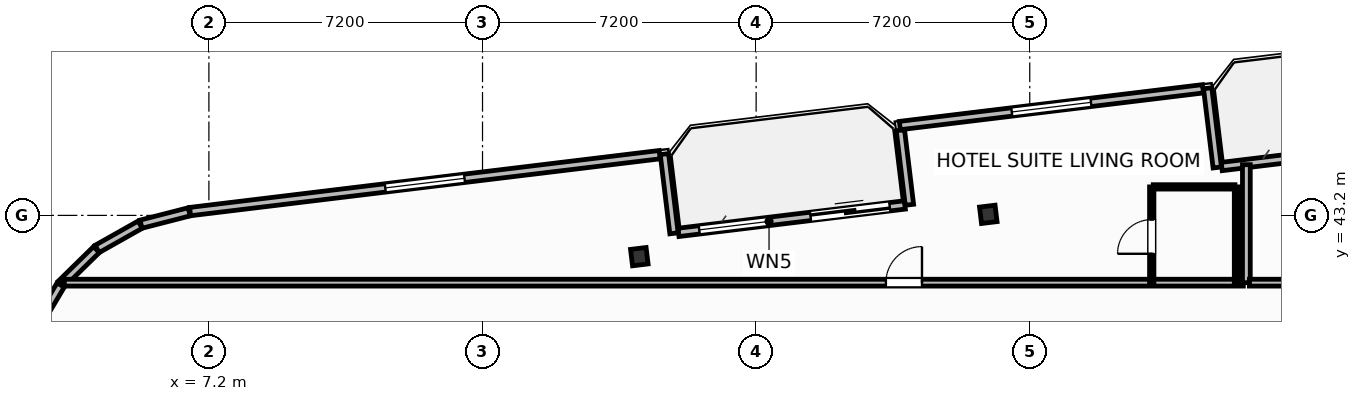
"""IFC4 building model, lengths in metres.
Left out: names, types, materials, properties, quantities, classifications, styles, units other than length and angle.
Written with IfcOpenShell. Run it as: python <this file> out.ifc"""

import sys

from ifc_helpers import new_model, si_unit, direction, frame, frame_2d, origin, origin_2d, place, context, subcontext, project, spatial, rectangle, i_section, extrude, element, fill, save


model = new_model("IFC4")
c1 = context("Model", 3, precision=1e-05, world=origin(), true_north=direction((0.0, 1.0)))
c2 = subcontext(c1, "Body", "Model", "MODEL_VIEW")
j1 = project(units=[si_unit("LENGTHUNIT", "METRE"), si_unit("PLANEANGLEUNIT", "RADIAN")], contexts=[c1])
p1 = place(None, origin())
s1 = spatial("IfcSite", under=j1, at=p1, CompositionType="ELEMENT")
p2 = place(p1, origin())
s2 = spatial("IfcBuilding", under=s1, at=p2, CompositionType="ELEMENT")
p3 = place(p2, frame((0.0, 0.0, 174.6)))
s3 = spatial("IfcBuildingStorey", under=s2, at=p3, CompositionType="ELEMENT", Elevation=174.6)
for number, where, z_axis, x_axis in (
    (1, (27.709, 43.227, 0.0), (0.0, 0.0, 1.0), (0.993, 0.12, 0.0)),
    (2, (18.526, 42.114, 0.0), (0.0, 0.0, 1.0), (0.993, 0.12, 0.0)),
):
    element("IfcColumn", number, at=place(p3, frame(where, z_axis=z_axis, x_axis=x_axis)), inside=s3, PredefinedType="COLUMN", context=c2, shape_type="SweptSolid", body=[
        extrude(i_section(OverallWidth=0.412, OverallDepth=0.435, WebThickness=0.036, FlangeThickness=0.057, FilletRadius=0.025, at=origin_2d()), origin(), (0.0, 0.0, 1.0), 3.7),
    ])
p4 = place(p3, frame((19.557, 42.753, 0.0), z_axis=(0.0, 0.0, 1.0), x_axis=(0.992729951822, 0.120362962556, 0.0)))
e3 = element("IfcWall", 3, at=p4, inside=s3, PredefinedType="SOLIDWALL", context=c2, shape_type="SweptSolid", body=[
    extrude(rectangle(XDim=6.0, YDim=0.22, at=frame_2d((3.0, 0.0))), origin(), (0.0, 0.0, 1.0), 2.73),
])
p5 = place(p4, frame((3.5, 0.0, 0.0)))
e4 = element("IfcOpeningElement", 4, at=p5, cuts=e3, PredefinedType="OPENING", context=c2, shape_type="SweptSolid", body=[
    extrude(rectangle(XDim=2.1, YDim=2.3, at=frame_2d((1.05, 1.15))), frame((0.0, 0.12, 0.0), z_axis=(0.0, -1.0, 0.0), x_axis=(1.0, 0.0, 0.0)), (0.0, 0.0, 1.0), 0.24),
])
p6 = place(p4, frame((0.55, 0.0, 0.75)))
e5 = element("IfcOpeningElement", 5, at=p6, cuts=e3, PredefinedType="OPENING", context=c2, shape_type="SweptSolid", body=[
    extrude(rectangle(XDim=1.85, YDim=1.75, at=frame_2d((0.925, 0.875))), frame((0.0, 0.12, 0.0), z_axis=(0.0, -1.0, 0.0), x_axis=(1.0, 0.0, 0.0)), (0.0, 0.0, 1.0), 0.24),
])
p7 = place(p3, frame((33.852, 44.486, 0.0), z_axis=(0.0, 0.0, 1.0), x_axis=(0.992729951822, 0.120362962556, 0.0)))
e6 = element("IfcWall", 6, at=p7, inside=s3, PredefinedType="SOLIDWALL", context=c2, shape_type="SweptSolid", body=[
    extrude(rectangle(XDim=6.0, YDim=0.22, at=frame_2d((3.0, 0.0))), origin(), (0.0, 0.0, 1.0), 2.73),
])
p8 = place(p7, frame((3.5, 0.0, 0.0)))
e7 = element("IfcOpeningElement", 7, at=p8, cuts=e6, PredefinedType="OPENING", context=c2, shape_type="SweptSolid", body=[
    extrude(rectangle(XDim=2.1, YDim=2.3, at=frame_2d((1.05, 1.15))), frame((0.0, 0.12, 0.0), z_axis=(0.0, -1.0, 0.0), x_axis=(1.0, 0.0, 0.0)), (0.0, 0.0, 1.0), 0.24),
])
p9 = place(p3, frame((33.734, 44.461, 0.0), z_axis=(0.0, 0.0, 1.0), x_axis=(-0.120327895535, 0.992734202874, 0.0)))
e8 = element("IfcWall", 8, at=p9, inside=s3, PredefinedType="SOLIDWALL", context=c2, shape_type="SweptSolid", body=[
    extrude(rectangle(XDim=2.1, YDim=0.22, at=frame_2d((1.05, 0.0))), origin(), (0.0, 0.0, 1.0), 2.73),
])
p10 = place(p3, frame((33.357, 46.531, 0.0), z_axis=(0.0, 0.0, 1.0), x_axis=(-0.992731032022, -0.120354052946, 0.0)))
e9 = element("IfcWall", 9, at=p10, inside=s3, PredefinedType="SOLIDWALL", context=c2, shape_type="SweptSolid", body=[
    extrude(rectangle(XDim=8.035, YDim=0.22, at=frame_2d((4.018, 0.0))), origin(), (0.0, 0.0, 1.0), 2.73),
])
p11 = place(p10, frame((2.968, 0.0, 0.8)))
e10 = element("IfcOpeningElement", 10, at=p11, cuts=e9, PredefinedType="OPENING", context=c2, shape_type="SweptSolid", body=[
    extrude(rectangle(XDim=2.1, YDim=1.75, at=frame_2d((1.05, 0.875))), frame((0.0, 0.12, 0.0), z_axis=(0.0, -1.0, 0.0), x_axis=(1.0, 0.0, 0.0)), (0.0, 0.0, 1.0), 0.24),
])
p12 = place(p3, frame((25.396, 45.44, 0.0), z_axis=(0.0, 0.0, 1.0), x_axis=(0.120275992932, -0.992740492538, 0.0)))
e11 = element("IfcWall", 11, at=p12, inside=s3, PredefinedType="SOLIDWALL", context=c2, shape_type="SweptSolid", body=[
    extrude(rectangle(XDim=1.975, YDim=0.22, at=frame_2d((0.988, 0.0))), origin(), (0.0, 0.0, 1.0), 2.73),
])
p13 = place(p3, frame((19.439, 42.729, 0.0), z_axis=(0.0, 0.0, 1.0), x_axis=(-0.120327895535, 0.992734202874, 0.0)))
e12 = element("IfcWall", 12, at=p13, inside=s3, PredefinedType="SOLIDWALL", context=c2, shape_type="SweptSolid", body=[
    extrude(rectangle(XDim=2.1, YDim=0.22, at=frame_2d((1.05, 0.0))), origin(), (0.0, 0.0, 1.0), 2.73),
])
p14 = place(p3, frame((19.062, 44.798, 0.0), z_axis=(0.0, 0.0, 1.0), x_axis=(-0.992733569027, -0.120333124809, 0.0)))
e13 = element("IfcWall", 13, at=p14, inside=s3, PredefinedType="SOLIDWALL", context=c2, shape_type="SweptSolid", body=[
    extrude(rectangle(XDim=12.447, YDim=0.22, at=frame_2d((6.224, 0.0))), origin(), (0.0, 0.0, 1.0), 2.73),
])
p15 = place(p14, frame((5.174, 0.0, 0.8)))
e14 = element("IfcOpeningElement", 14, at=p15, cuts=e13, PredefinedType="OPENING", context=c2, shape_type="SweptSolid", body=[
    extrude(rectangle(XDim=2.1, YDim=1.75, at=frame_2d((1.05, 0.875))), frame((0.0, 0.12, 0.0), z_axis=(0.0, -1.0, 0.0), x_axis=(1.0, 0.0, 0.0)), (0.0, 0.0, 1.0), 0.24),
])
p16 = place(p3, frame((6.681, 43.294, 0.0), z_axis=(0.0, 0.0, 1.0), x_axis=(-0.968496788899, -0.2490260426, 0.0)))
e15 = element("IfcWall", 15, at=p16, inside=s3, PredefinedType="SOLIDWALL", context=c2, shape_type="SweptSolid", body=[
    extrude(rectangle(XDim=1.309, YDim=0.22, at=frame_2d((0.654, 0.0))), origin(), (0.0, 0.0, 1.0), 2.73),
])
for number, where, z_axis, x_axis in (
    (16, (5.392, 42.956, 0.0), (0.0, 0.0, 1.0), (-0.871, -0.491, 0.0)),
    (17, (4.241, 42.3, 0.0), (0.0, 0.0, 1.0), (-0.714, -0.7, 0.0)),
):
    element("IfcWall", number, at=place(p3, frame(where, z_axis=z_axis, x_axis=x_axis)), inside=s3, PredefinedType="SOLIDWALL", context=c2, shape_type="SweptSolid", body=[
        extrude(rectangle(XDim=1.301, YDim=0.22, at=frame_2d((0.65, 0.0))), origin(), (0.0, 0.0, 1.0), 2.73),
    ])
p17 = place(p3, frame((3.299, 41.368, 0.0), z_axis=(0.0, 0.0, 1.0), x_axis=(-0.508716668029, -0.860933999601, 0.0)))
e18 = element("IfcWall", 18, at=p17, inside=s3, PredefinedType="SOLIDWALL", context=c2, shape_type="SweptSolid", body=[
    extrude(rectangle(XDim=1.301, YDim=0.22, at=frame_2d((0.65, 0.0))), origin(), (0.0, 0.0, 1.0), 2.73),
])
p18 = place(p3, frame((3.393, 41.43, 0.0), z_axis=(0.0, 0.0, 1.0), x_axis=(1.0, 0.0, 0.0)))
e19 = element("IfcWall", 19, at=p18, inside=s3, PredefinedType="PARTITIONING", context=c2, shape_type="SweptSolid", body=[
    extrude(rectangle(XDim=31.027, YDim=0.18, at=frame_2d((15.513, 0.0))), origin(), (0.0, 0.0, 1.0), 2.662),
])
p19 = place(p18, frame((21.621, 0.0, 0.0)))
e20 = element("IfcOpeningElement", 20, at=p19, cuts=e19, PredefinedType="OPENING", context=c2, shape_type="SweptSolid", body=[
    extrude(rectangle(XDim=0.95, YDim=2.15, at=frame_2d((0.475, 1.075))), frame((0.0, 0.1, 0.0), z_axis=(0.0, -1.0, 0.0), x_axis=(1.0, 0.0, 0.0)), (0.0, 0.0, 1.0), 0.2),
])
p20 = place(p3, frame((32.05, 43.95, 0.0), z_axis=(0.0, 0.0, 1.0), x_axis=(1.0, 0.0, 0.0)))
e21 = element("IfcWall", 21, at=p20, inside=s3, PredefinedType="PARTITIONING", context=c2, shape_type="SweptSolid", body=[
    extrude(rectangle(XDim=2.15, YDim=0.115, at=frame_2d((1.075, 0.0))), origin(), (0.0, 0.0, 1.0), 2.824),
])
p21 = place(p3, frame((32.01, 41.43, 0.0), z_axis=(0.0, 0.0, 1.0), x_axis=(0.0, 1.0, 0.0)))
e22 = element("IfcWall", 22, at=p21, inside=s3, PredefinedType="PARTITIONING", context=c2, shape_type="SweptSolid", body=[
    extrude(rectangle(XDim=2.52, YDim=0.115, at=frame_2d((1.26, 0.0))), origin(), (0.0, 0.0, 1.0), 3.45),
])
p22 = place(p21, frame((0.76, 0.0, 0.0)))
e23 = element("IfcOpeningElement", 23, at=p22, cuts=e22, PredefinedType="OPENING", context=c2, shape_type="SweptSolid", body=[
    extrude(rectangle(XDim=0.9, YDim=2.05, at=frame_2d((0.45, 1.025))), frame((0.0, 0.067, 0.0), z_axis=(0.0, -1.0, 0.0), x_axis=(1.0, 0.0, 0.0)), (0.0, 0.0, 1.0), 0.135),
])
p23 = place(p3, frame((34.24, 41.43, 0.0), z_axis=(0.0, 0.0, 1.0), x_axis=(0.0, 1.0, 0.0)))
e24 = element("IfcWall", 24, at=p23, inside=s3, PredefinedType="PARTITIONING", context=c2, shape_type="SweptSolid", body=[
    extrude(rectangle(XDim=2.52, YDim=0.115, at=frame_2d((1.26, 0.0))), origin(), (0.0, 0.0, 1.0), 3.45),
])
p24 = place(p3, frame((34.5, 41.43, 0.0), z_axis=(0.0, 0.0, 1.0), x_axis=(0.0, 1.0, 0.0)))
e25 = element("IfcWall", 25, at=p24, inside=s3, PredefinedType="PARTITIONING", context=c2, shape_type="SweptSolid", body=[
    extrude(rectangle(XDim=3.104, YDim=0.205, at=frame_2d((1.552, 0.0))), origin(), (0.0, 0.0, 1.0), 3.45),
])
p25 = place(p3, frame((34.58, 41.43, 0.0), z_axis=(0.0, 0.0, 1.0), x_axis=(1.0, 0.0, 0.0)))
e26 = element("IfcWall", 26, at=p25, inside=s3, PredefinedType="PARTITIONING", context=c2, shape_type="SweptSolid", body=[
    extrude(rectangle(XDim=11.84, YDim=0.18, at=frame_2d((5.92, 0.0))), origin(), (0.0, 0.0, 1.0), 3.45),
])
p26 = place(p25, frame((7.68, 0.0, 0.0)))
e27 = element("IfcOpeningElement", 27, at=p26, cuts=e26, PredefinedType="OPENING", context=c2, shape_type="SweptSolid", body=[
    extrude(rectangle(XDim=0.95, YDim=2.15, at=frame_2d((0.475, 1.075))), frame((0.0, 0.1, 0.0), z_axis=(0.0, -1.0, 0.0), x_axis=(1.0, 0.0, 0.0)), (0.0, 0.0, 1.0), 0.2),
])
p27 = place(p5, origin())
e28 = element("IfcDoor", 28, at=p27, inside=s3, OperationType="SLIDING_TO_LEFT", PredefinedType="DOOR", context=c2, shape_type="SweptSolid", body=[
    extrude(rectangle(XDim=2.1, YDim=2.3, at=frame_2d((1.05, 1.15))), frame((0.0, 0.025, 0.0), z_axis=(0.0, -1.0, 0.0), x_axis=(1.0, 0.0, 0.0)), (0.0, 0.0, 1.0), 0.05),
])
fill(e4, e28)
p28 = place(p6, origin())
e29 = element("IfcWindow", 29, at=p28, inside=s3, PartitioningType="SINGLE_PANEL", PredefinedType="WINDOW", context=c2, shape_type="SweptSolid", body=[
    extrude(rectangle(XDim=1.85, YDim=1.75, at=frame_2d((0.925, 0.875))), frame((0.0, 0.03, 0.0), z_axis=(0.0, -1.0, 0.0), x_axis=(1.0, 0.0, 0.0)), (0.0, 0.0, 1.0), 0.06),
])
fill(e5, e29)
p29 = place(p11, origin())
e30 = element("IfcWindow", 30, at=p29, inside=s3, PartitioningType="SINGLE_PANEL", PredefinedType="WINDOW", context=c2, shape_type="SweptSolid", body=[
    extrude(rectangle(XDim=2.1, YDim=1.75, at=frame_2d((1.05, 0.875))), frame((0.0, 0.03, 0.0), z_axis=(0.0, -1.0, 0.0), x_axis=(1.0, 0.0, 0.0)), (0.0, 0.0, 1.0), 0.06),
])
fill(e10, e30)
p30 = place(p15, origin())
e31 = element("IfcWindow", 31, at=p30, inside=s3, PartitioningType="SINGLE_PANEL", PredefinedType="WINDOW", context=c2, shape_type="SweptSolid", body=[
    extrude(rectangle(XDim=2.1, YDim=1.75, at=frame_2d((1.05, 0.875))), frame((0.0, 0.03, 0.0), z_axis=(0.0, -1.0, 0.0), x_axis=(1.0, 0.0, 0.0)), (0.0, 0.0, 1.0), 0.06),
])
fill(e14, e31)
p31 = place(p19, origin())
e32 = element("IfcDoor", 32, at=p31, inside=s3, OperationType="SINGLE_SWING_RIGHT", PredefinedType="DOOR", context=c2, shape_type="SweptSolid", body=[
    extrude(rectangle(XDim=0.95, YDim=2.15, at=frame_2d((0.475, 1.075))), frame((0.0, 0.025, 0.0), z_axis=(0.0, -1.0, 0.0), x_axis=(1.0, 0.0, 0.0)), (0.0, 0.0, 1.0), 0.05),
])
fill(e20, e32)
p32 = place(p22, origin())
e33 = element("IfcDoor", 33, at=p32, inside=s3, OperationType="SINGLE_SWING_LEFT", PredefinedType="DOOR", context=c2, shape_type="SweptSolid", body=[
    extrude(rectangle(XDim=0.9, YDim=2.05, at=frame_2d((0.45, 1.025))), frame((0.0, 0.025, 0.0), z_axis=(0.0, -1.0, 0.0), x_axis=(1.0, 0.0, 0.0)), (0.0, 0.0, 1.0), 0.05),
])
fill(e23, e33)
save(model, sys.argv[1])
